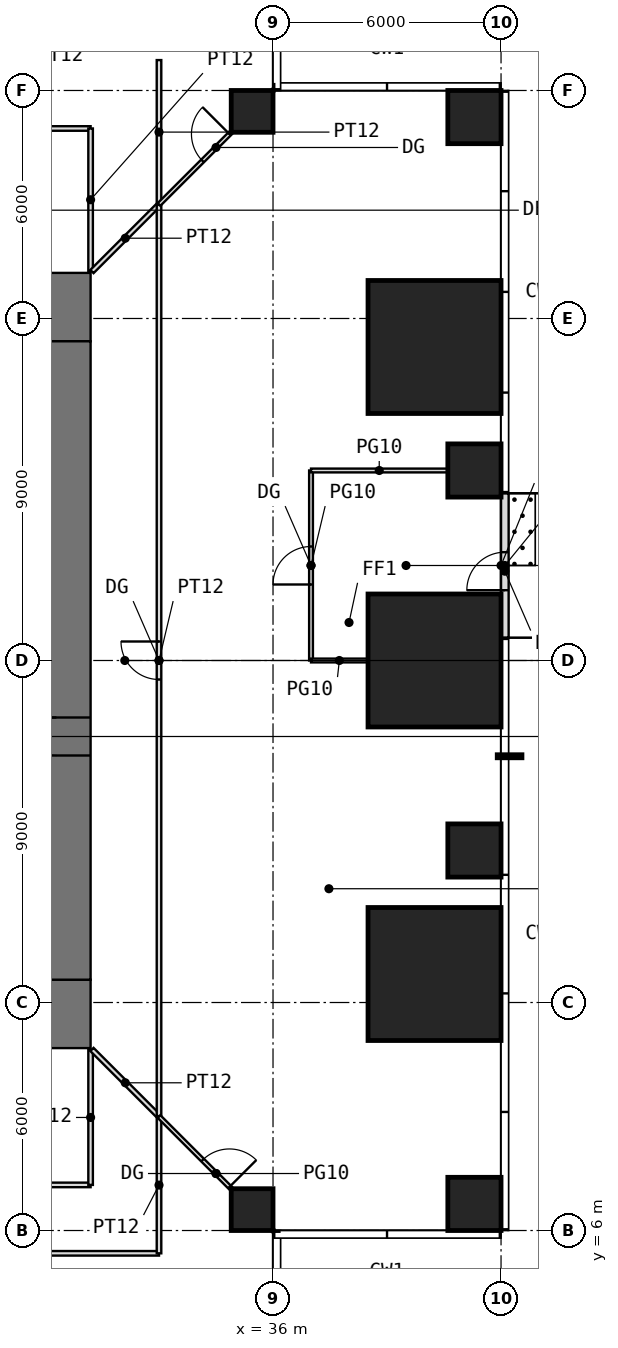
"""IFC4 building model, lengths in metres.
Left out: names, types, materials, properties, quantities, classifications, styles, units other than length and angle.
Written with IfcOpenShell. Run it as: python <this file> out.ifc"""

import sys

from ifc_helpers import new_model, si_unit, direction, frame, frame_2d, origin, origin_2d, place, context, subcontext, project, spatial, rectangle, extrude, element, fill, save


model = new_model("IFC4")
c1 = context("Model", 3, precision=1e-05, world=origin(), true_north=direction((0.0, 1.0)))
c2 = subcontext(c1, "Body", "Model", "MODEL_VIEW")
j1 = project(units=[si_unit("LENGTHUNIT", "METRE"), si_unit("PLANEANGLEUNIT", "RADIAN")], contexts=[c1])
p1 = place(None, origin())
s1 = spatial("IfcSite", under=j1, at=p1, CompositionType="ELEMENT")
p2 = place(p1, origin())
s2 = spatial("IfcBuilding", under=s1, at=p2, CompositionType="ELEMENT")
p3 = place(p2, frame((0.0, 0.0, 30.5)))
s3 = spatial("IfcBuildingStorey", under=s2, at=p3, CompositionType="ELEMENT", Elevation=30.5)
p4 = place(p3, frame((35.45, 6.55, 0.0), z_axis=(0.0, 0.0, 1.0), x_axis=(1.0, 0.0, 0.0)))
e1 = element("IfcColumn", 1, at=p4, inside=s3, PredefinedType="COLUMN", context=c2, shape_type="SweptSolid", body=[
    extrude(rectangle(XDim=1.1, YDim=1.1, at=origin_2d()), origin(), (0.0, 0.0, 1.0), 4.0),
])
p5 = place(p3, frame((41.3, 6.7, 0.0), z_axis=(0.0, 0.0, 1.0), x_axis=(1.0, 0.0, 0.0)))
e2 = element("IfcColumn", 2, at=p5, inside=s3, PredefinedType="COLUMN", context=c2, shape_type="SweptSolid", body=[
    extrude(rectangle(XDim=1.4, YDim=1.4, at=origin_2d()), origin(), (0.0, 0.0, 1.0), 4.0),
])
p6 = place(p3, frame((40.25, 12.75, 0.0), z_axis=(0.0, 0.0, 1.0), x_axis=(1.0, 0.0, 0.0)))
e3 = element("IfcColumn", 3, at=p6, inside=s3, PredefinedType="COLUMN", context=c2, shape_type="SweptSolid", body=[
    extrude(rectangle(XDim=3.5, YDim=3.5, at=origin_2d()), origin(), (0.0, 0.0, 1.0), 4.0),
])
p7 = place(p3, frame((41.3, 16.0, 0.0), z_axis=(0.0, 0.0, 1.0), x_axis=(1.0, 0.0, 0.0)))
e4 = element("IfcColumn", 4, at=p7, inside=s3, PredefinedType="COLUMN", context=c2, shape_type="SweptSolid", body=[
    extrude(rectangle(XDim=1.4, YDim=1.4, at=origin_2d()), origin(), (0.0, 0.0, 1.0), 4.0),
])
p8 = place(p3, frame((40.25, 21.0, 0.0), z_axis=(0.0, 0.0, 1.0), x_axis=(1.0, 0.0, 0.0)))
e5 = element("IfcColumn", 5, at=p8, inside=s3, PredefinedType="COLUMN", context=c2, shape_type="SweptSolid", body=[
    extrude(rectangle(XDim=3.5, YDim=3.5, at=origin_2d()), origin(), (0.0, 0.0, 1.0), 4.0),
])
p9 = place(p3, frame((41.3, 26.0, 0.0), z_axis=(0.0, 0.0, 1.0), x_axis=(1.0, 0.0, 0.0)))
e6 = element("IfcColumn", 6, at=p9, inside=s3, PredefinedType="COLUMN", context=c2, shape_type="SweptSolid", body=[
    extrude(rectangle(XDim=1.4, YDim=1.4, at=origin_2d()), origin(), (0.0, 0.0, 1.0), 4.0),
])
p10 = place(p3, frame((40.25, 29.25, 0.0), z_axis=(0.0, 0.0, 1.0), x_axis=(1.0, 0.0, 0.0)))
e7 = element("IfcColumn", 7, at=p10, inside=s3, PredefinedType="COLUMN", context=c2, shape_type="SweptSolid", body=[
    extrude(rectangle(XDim=3.5, YDim=3.5, at=origin_2d()), origin(), (0.0, 0.0, 1.0), 4.0),
])
p11 = place(p3, frame((35.45, 35.45, 0.0), z_axis=(0.0, 0.0, 1.0), x_axis=(1.0, 0.0, 0.0)))
e8 = element("IfcColumn", 8, at=p11, inside=s3, PredefinedType="COLUMN", context=c2, shape_type="SweptSolid", body=[
    extrude(rectangle(XDim=1.1, YDim=1.1, at=origin_2d()), origin(), (0.0, 0.0, 1.0), 4.0),
])
p12 = place(p3, frame((41.3, 35.3, 0.0), z_axis=(0.0, 0.0, 1.0), x_axis=(1.0, 0.0, 0.0)))
e9 = element("IfcColumn", 9, at=p12, inside=s3, PredefinedType="COLUMN", context=c2, shape_type="SweptSolid", body=[
    extrude(rectangle(XDim=1.4, YDim=1.4, at=origin_2d()), origin(), (0.0, 0.0, 1.0), 4.0),
])
p13 = place(p3, frame((42.1, 21.6, 0.0), z_axis=(0.0, 0.0, 1.0), x_axis=(0.0, 1.0, 0.0)))
e10 = element("IfcWall", 10, at=p13, inside=s3, PredefinedType="USERDEFINED", context=c2, shape_type="SweptSolid", body=[
    extrude(rectangle(XDim=3.8, YDim=0.2, at=frame_2d((1.9, 0.0))), origin(), (0.0, 0.0, 1.0), 3.75),
])
p14 = place(p13, frame((1.25, 0.0, 0.0)))
e11 = element("IfcOpeningElement", 11, at=p14, cuts=e10, PredefinedType="OPENING", context=c2, shape_type="SweptSolid", body=[
    extrude(rectangle(XDim=1.0, YDim=2.4, at=frame_2d((0.5, 1.2))), frame((0.0, 0.11, 0.0), z_axis=(0.0, -1.0, 0.0), x_axis=(1.0, 0.0, 0.0)), (0.0, 0.0, 1.0), 0.22),
])
p15 = place(p3, frame((10.8, 11.7, -0.05), z_axis=(0.0, 0.0, 1.0), x_axis=(1.0, 0.0, 0.0)))
e12 = element("IfcWall", 12, at=p15, inside=s3, PredefinedType="SHEAR", context=c2, shape_type="SweptSolid", body=[
    extrude(rectangle(XDim=20.4, YDim=1.8, at=frame_2d((10.2, 0.0))), origin(), (0.0, 0.0, 1.0), 4.0),
])
p16 = place(p15, frame((9.2, 0.0, 0.05)))
e13 = element("IfcOpeningElement", 13, at=p16, cuts=e12, PredefinedType="OPENING", context=c2, shape_type="SweptSolid", body=[
    extrude(rectangle(XDim=2.0, YDim=2.2, at=frame_2d((1.0, 1.1))), frame((0.0, 0.91, 0.0), z_axis=(0.0, -1.0, 0.0), x_axis=(1.0, 0.0, 0.0)), (0.0, 0.0, 1.0), 1.82),
])
p17 = place(p3, frame((10.8, 30.3, -0.05), z_axis=(0.0, 0.0, 1.0), x_axis=(1.0, 0.0, 0.0)))
e14 = element("IfcWall", 14, at=p17, inside=s3, PredefinedType="SHEAR", context=c2, shape_type="SweptSolid", body=[
    extrude(rectangle(XDim=20.4, YDim=1.8, at=frame_2d((10.2, 0.0))), origin(), (0.0, 0.0, 1.0), 4.0),
])
p18 = place(p17, frame((9.2, 0.0, 0.05)))
e15 = element("IfcOpeningElement", 15, at=p18, cuts=e14, PredefinedType="OPENING", context=c2, shape_type="SweptSolid", body=[
    extrude(rectangle(XDim=2.0, YDim=2.2, at=frame_2d((1.0, 1.1))), frame((0.0, 0.91, 0.0), z_axis=(0.0, -1.0, 0.0), x_axis=(1.0, 0.0, 0.0)), (0.0, 0.0, 1.0), 1.82),
])
p19 = place(p3, frame((30.3, 12.6, -0.05), z_axis=(0.0, 0.0, 1.0), x_axis=(0.0, 1.0, 0.0)))
e16 = element("IfcWall", 16, at=p19, inside=s3, PredefinedType="SHEAR", context=c2, shape_type="SweptSolid", body=[
    extrude(rectangle(XDim=16.8, YDim=1.8, at=frame_2d((8.4, 0.0))), origin(), (0.0, 0.0, 1.0), 4.0),
])
p20 = place(p19, frame((5.9, 0.0, 0.05)))
e17 = element("IfcOpeningElement", 17, at=p20, cuts=e16, PredefinedType="OPENING", context=c2, shape_type="SweptSolid", body=[
    extrude(rectangle(XDim=1.0, YDim=2.2, at=frame_2d((0.5, 1.1))), frame((0.0, 0.91, 0.0), z_axis=(0.0, -1.0, 0.0), x_axis=(1.0, 0.0, 0.0)), (0.0, 0.0, 1.0), 1.82),
])
p21 = place(p3, frame((6.0, 5.4, 0.0), z_axis=(0.0, 0.0, 1.0), x_axis=(1.0, 0.0, 0.0)))
e18 = element("IfcWall", 18, at=p21, inside=s3, PredefinedType="PARTITIONING", context=c2, shape_type="SweptSolid", body=[
    extrude(rectangle(XDim=27.0, YDim=0.12, at=frame_2d((13.5, 0.0))), origin(), (0.0, 0.0, 1.0), 3.75),
])
p22 = place(p21, frame((14.8, 0.0, 0.0)))
e19 = element("IfcOpeningElement", 19, at=p22, cuts=e18, PredefinedType="OPENING", context=c2, shape_type="SweptSolid", body=[
    extrude(rectangle(XDim=1.0, YDim=2.4, at=frame_2d((0.5, 1.2))), frame((0.0, 0.07, 0.0), z_axis=(0.0, -1.0, 0.0), x_axis=(1.0, 0.0, 0.0)), (0.0, 0.0, 1.0), 0.14),
])
p23 = place(p3, frame((23.6, 7.2, 0.0), z_axis=(0.0, 0.0, 1.0), x_axis=(1.0, 0.0, 0.0)))
e20 = element("IfcWall", 20, at=p23, inside=s3, PredefinedType="PARTITIONING", context=c2, shape_type="SweptSolid", body=[
    extrude(rectangle(XDim=7.6, YDim=0.12, at=frame_2d((3.8, 0.0))), origin(), (0.0, 0.0, 1.0), 3.75),
])
p24 = place(p23, frame((3.3, 0.0, 0.0)))
e21 = element("IfcOpeningElement", 21, at=p24, cuts=e20, PredefinedType="OPENING", context=c2, shape_type="SweptSolid", body=[
    extrude(rectangle(XDim=1.0, YDim=2.2, at=frame_2d((0.5, 1.1))), frame((0.0, 0.07, 0.0), z_axis=(0.0, -1.0, 0.0), x_axis=(1.0, 0.0, 0.0)), (0.0, 0.0, 1.0), 0.14),
])
p25 = place(p3, frame((27.4, 35.0, 0.0), z_axis=(0.0, 0.0, 1.0), x_axis=(1.0, 0.0, 0.0)))
e22 = element("IfcWall", 22, at=p25, inside=s3, PredefinedType="PARTITIONING", context=c2, shape_type="SweptSolid", body=[
    extrude(rectangle(XDim=3.8, YDim=0.12, at=frame_2d((1.9, 0.0))), origin(), (0.0, 0.0, 1.0), 3.75),
])
p26 = place(p25, frame((1.4, 0.0, 0.0)))
e23 = element("IfcOpeningElement", 23, at=p26, cuts=e22, PredefinedType="OPENING", context=c2, shape_type="SweptSolid", body=[
    extrude(rectangle(XDim=1.0, YDim=2.4, at=frame_2d((0.5, 1.2))), frame((0.0, 0.07, 0.0), z_axis=(0.0, -1.0, 0.0), x_axis=(1.0, 0.0, 0.0)), (0.0, 0.0, 1.0), 0.14),
])
p27 = place(p3, frame((31.2, 7.2, 0.0), z_axis=(0.0, 0.0, 1.0), x_axis=(0.0, 1.0, 0.0)))
e24 = element("IfcWall", 24, at=p27, inside=s3, PredefinedType="PARTITIONING", context=c2, shape_type="SweptSolid", body=[
    extrude(rectangle(XDim=3.55, YDim=0.12, at=frame_2d((1.775, 0.0))), origin(), (0.0, 0.0, 1.0), 3.75),
])
p28 = place(p3, frame((31.2, 31.25, 0.0), z_axis=(0.0, 0.0, 1.0), x_axis=(0.0, 1.0, 0.0)))
e25 = element("IfcWall", 25, at=p28, inside=s3, PredefinedType="PARTITIONING", context=c2, shape_type="SweptSolid", body=[
    extrude(rectangle(XDim=3.75, YDim=0.12, at=frame_2d((1.875, 0.0))), origin(), (0.0, 0.0, 1.0), 3.75),
])
for number, where, z_axis, x_axis in (
    (26, (31.235, 10.765, 0.0), (0.0, 0.0, 1.0), (0.707, -0.707, 0.0)),
    (27, (31.235, 31.235, 0.0), (0.0, 0.0, 1.0), (0.707, 0.707, 0.0)),
):
    element("IfcWall", number, at=place(p3, frame(where, z_axis=z_axis, x_axis=x_axis)), inside=s3, PredefinedType="PARTITIONING", context=c2, shape_type="SweptSolid", body=[
        extrude(rectangle(XDim=2.481, YDim=0.12, at=frame_2d((1.241, 0.0))), origin(), (0.0, 0.0, 1.0), 3.75),
    ])
p29 = place(p3, frame((33.0, 5.4, 0.0), z_axis=(0.0, 0.0, 1.0), x_axis=(0.0, 1.0, 0.0)))
e28 = element("IfcWall", 28, at=p29, inside=s3, PredefinedType="PARTITIONING", context=c2, shape_type="SweptSolid", body=[
    extrude(rectangle(XDim=3.59, YDim=0.12, at=frame_2d((1.795, 0.0))), origin(), (0.0, 0.0, 1.0), 3.75),
])
p30 = place(p3, frame((33.0, 9.01, 0.0), z_axis=(0.0, 0.0, 1.0), x_axis=(0.0, 1.0, 0.0)))
e29 = element("IfcWall", 29, at=p30, inside=s3, PredefinedType="PARTITIONING", context=c2, shape_type="SweptSolid", body=[
    extrude(rectangle(XDim=23.98, YDim=0.12, at=frame_2d((11.99, 0.0))), origin(), (0.0, 0.0, 1.0), 3.75),
])
p31 = place(p30, frame((11.49, 0.0, 0.0)))
e30 = element("IfcOpeningElement", 30, at=p31, cuts=e29, PredefinedType="OPENING", context=c2, shape_type="SweptSolid", body=[
    extrude(rectangle(XDim=1.0, YDim=2.4, at=frame_2d((0.5, 1.2))), frame((0.0, 0.07, 0.0), z_axis=(0.0, -1.0, 0.0), x_axis=(1.0, 0.0, 0.0)), (0.0, 0.0, 1.0), 0.14),
])
p32 = place(p3, frame((33.0, 33.01, 0.0), z_axis=(0.0, 0.0, 1.0), x_axis=(0.0, 1.0, 0.0)))
e31 = element("IfcWall", 31, at=p32, inside=s3, PredefinedType="PARTITIONING", context=c2, shape_type="SweptSolid", body=[
    extrude(rectangle(XDim=3.79, YDim=0.12, at=frame_2d((1.895, 0.0))), origin(), (0.0, 0.0, 1.0), 3.75),
])
p33 = place(p3, frame((37.0, 21.0, 0.0), z_axis=(0.0, 0.0, 1.0), x_axis=(0.0, 1.0, 0.0)))
e32 = element("IfcWall", 32, at=p33, inside=s3, PredefinedType="PARTITIONING", context=c2, shape_type="SweptSolid", body=[
    extrude(rectangle(XDim=5.0, YDim=0.1, at=frame_2d((2.5, 0.0))), origin(), (0.0, 0.0, 1.0), 3.75),
])
p34 = place(p33, frame((2.0, 0.0, 0.0)))
e33 = element("IfcOpeningElement", 33, at=p34, cuts=e32, PredefinedType="OPENING", context=c2, shape_type="SweptSolid", body=[
    extrude(rectangle(XDim=1.0, YDim=2.4, at=frame_2d((0.5, 1.2))), frame((0.0, 0.06, 0.0), z_axis=(0.0, -1.0, 0.0), x_axis=(1.0, 0.0, 0.0)), (0.0, 0.0, 1.0), 0.12),
])
p35 = place(p3, frame((37.0, 21.0, 0.0), z_axis=(0.0, 0.0, 1.0), x_axis=(1.0, 0.0, 0.0)))
e34 = element("IfcWall", 34, at=p35, inside=s3, PredefinedType="PARTITIONING", context=c2, shape_type="SweptSolid", body=[
    extrude(rectangle(XDim=1.49, YDim=0.1, at=frame_2d((0.745, 0.0))), origin(), (0.0, 0.0, 1.0), 3.75),
])
p36 = place(p3, frame((37.0, 26.0, 0.0), z_axis=(0.0, 0.0, 1.0), x_axis=(1.0, 0.0, 0.0)))
e35 = element("IfcWall", 35, at=p36, inside=s3, PredefinedType="PARTITIONING", context=c2, shape_type="SweptSolid", body=[
    extrude(rectangle(XDim=3.59, YDim=0.1, at=frame_2d((1.795, 0.0))), origin(), (0.0, 0.0, 1.0), 3.75),
])
p37 = place(p3, frame((33.0, 9.0, 0.0), z_axis=(0.0, 0.0, 1.0), x_axis=(0.707106781187, -0.707106781187, 0.0)))
e36 = element("IfcWall", 36, at=p37, inside=s3, PredefinedType="PARTITIONING", context=c2, shape_type="SweptSolid", body=[
    extrude(rectangle(XDim=4.243, YDim=0.1, at=frame_2d((2.121, 0.0))), origin(), (0.0, 0.0, 1.0), 3.75),
])
p38 = place(p37, frame((1.621, 0.0, 0.0)))
e37 = element("IfcOpeningElement", 37, at=p38, cuts=e36, PredefinedType="OPENING", context=c2, shape_type="SweptSolid", body=[
    extrude(rectangle(XDim=1.0, YDim=2.4, at=frame_2d((0.5, 1.2))), frame((0.0, 0.06, 0.0), z_axis=(0.0, -1.0, 0.0), x_axis=(1.0, 0.0, 0.0)), (0.0, 0.0, 1.0), 0.12),
])
p39 = place(p3, frame((33.0, 33.0, 0.0), z_axis=(0.0, 0.0, 1.0), x_axis=(0.707106781187, 0.707106781187, 0.0)))
e38 = element("IfcWall", 38, at=p39, inside=s3, PredefinedType="PARTITIONING", context=c2, shape_type="SweptSolid", body=[
    extrude(rectangle(XDim=4.243, YDim=0.1, at=frame_2d((2.121, 0.0))), origin(), (0.0, 0.0, 1.0), 3.75),
])
p40 = place(p39, frame((1.621, 0.0, 0.0)))
e39 = element("IfcOpeningElement", 39, at=p40, cuts=e38, PredefinedType="OPENING", context=c2, shape_type="SweptSolid", body=[
    extrude(rectangle(XDim=1.0, YDim=2.4, at=frame_2d((0.5, 1.2))), frame((0.0, 0.06, 0.0), z_axis=(0.0, -1.0, 0.0), x_axis=(1.0, 0.0, 0.0)), (0.0, 0.0, 1.0), 0.12),
])
p41 = place(p14, origin())
e40 = element("IfcDoor", 40, at=p41, inside=s3, OperationType="SINGLE_SWING_LEFT", PredefinedType="DOOR", context=c2, shape_type="SweptSolid", body=[
    extrude(rectangle(XDim=1.0, YDim=2.4, at=frame_2d((0.5, 1.2))), frame((0.0, 0.025, 0.0), z_axis=(0.0, -1.0, 0.0), x_axis=(1.0, 0.0, 0.0)), (0.0, 0.0, 1.0), 0.05),
])
fill(e11, e40)
p42 = place(p20, origin())
e41 = element("IfcDoor", 41, at=p42, inside=s3, OperationType="SINGLE_SWING_RIGHT", PredefinedType="DOOR", context=c2, shape_type="SweptSolid", body=[
    extrude(rectangle(XDim=1.0, YDim=2.2, at=frame_2d((0.5, 1.1))), frame((0.0, 0.025, 0.0), z_axis=(0.0, -1.0, 0.0), x_axis=(1.0, 0.0, 0.0)), (0.0, 0.0, 1.0), 0.05),
])
fill(e17, e41)
p43 = place(p34, origin())
e42 = element("IfcDoor", 42, at=p43, inside=s3, OperationType="SINGLE_SWING_LEFT", PredefinedType="DOOR", context=c2, shape_type="SweptSolid", body=[
    extrude(rectangle(XDim=1.0, YDim=2.4, at=frame_2d((0.5, 1.2))), frame((0.0, 0.025, 0.0), z_axis=(0.0, -1.0, 0.0), x_axis=(1.0, 0.0, 0.0)), (0.0, 0.0, 1.0), 0.05),
])
fill(e33, e42)
p44 = place(p31, origin())
e43 = element("IfcDoor", 43, at=p44, inside=s3, OperationType="SINGLE_SWING_RIGHT", PredefinedType="DOOR", context=c2, shape_type="SweptSolid", body=[
    extrude(rectangle(XDim=1.0, YDim=2.4, at=frame_2d((0.5, 1.2))), frame((0.0, 0.025, 0.0), z_axis=(0.0, -1.0, 0.0), x_axis=(1.0, 0.0, 0.0)), (0.0, 0.0, 1.0), 0.05),
])
fill(e30, e43)
p45 = place(p38, origin())
e44 = element("IfcDoor", 44, at=p45, inside=s3, OperationType="SINGLE_SWING_RIGHT", PredefinedType="DOOR", context=c2, shape_type="SweptSolid", body=[
    extrude(rectangle(XDim=1.0, YDim=2.4, at=frame_2d((0.5, 1.2))), frame((0.0, 0.025, 0.0), z_axis=(0.0, -1.0, 0.0), x_axis=(1.0, 0.0, 0.0)), (0.0, 0.0, 1.0), 0.05),
])
fill(e37, e44)
p46 = place(p40, origin())
e45 = element("IfcDoor", 45, at=p46, inside=s3, OperationType="SINGLE_SWING_RIGHT", PredefinedType="DOOR", context=c2, shape_type="SweptSolid", body=[
    extrude(rectangle(XDim=1.0, YDim=2.4, at=frame_2d((0.5, 1.2))), frame((0.0, 0.025, 0.0), z_axis=(0.0, -1.0, 0.0), x_axis=(1.0, 0.0, 0.0)), (0.0, 0.0, 1.0), 0.05),
])
fill(e39, e45)
save(model, sys.argv[1])
